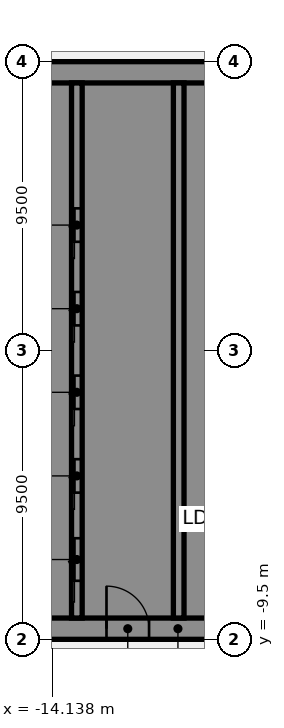
"""IFC4 building model, lengths in metres.
Left out: names, types, materials, properties, quantities, classifications, styles, units other than length and angle.
Written with IfcOpenShell. Run it as: python <this file> out.ifc"""

import sys

from ifc_helpers import new_model, si_unit, direction, frame, frame_2d, origin, place, context, subcontext, project, spatial, polyline, rectangle, outline, extrude, element, fill, save


model = new_model("IFC4")
c1 = context("Model", 3, precision=1e-05, world=origin(), true_north=direction((0.0, 1.0)))
c2 = subcontext(c1, "Body", "Model", "MODEL_VIEW")
j1 = project(units=[si_unit("LENGTHUNIT", "METRE"), si_unit("PLANEANGLEUNIT", "RADIAN")], contexts=[c1])
p1 = place(None, origin())
s1 = spatial("IfcSite", under=j1, at=p1, CompositionType="ELEMENT")
p2 = place(p1, origin())
s2 = spatial("IfcBuilding", under=s1, at=p2, CompositionType="ELEMENT")
p3 = place(p2, frame((0.0, 0.0, 20.0)))
s3 = spatial("IfcBuildingStorey", under=s2, at=p3, CompositionType="ELEMENT", Elevation=20.0)
p4 = place(p3, frame((-16.5, -9.15, 0.0), z_axis=(0.0, 0.0, 1.0), x_axis=(1.0, 0.0, 0.0)))
e1 = element("IfcWall", 1, at=p4, inside=s3, PredefinedType="SHEAR", context=c2, shape_type="SweptSolid", body=[
    extrude(rectangle(XDim=13.0, YDim=0.7, at=frame_2d((6.5, 0.0))), origin(), (0.0, 0.0, 1.0), 4.55),
])
p5 = place(p4, frame((4.15, 0.0, 0.0)))
e2 = element("IfcOpeningElement", 2, at=p5, cuts=e1, PredefinedType="OPENING", context=c2, shape_type="SweptSolid", body=[
    extrude(rectangle(XDim=1.4, YDim=2.1, at=frame_2d((0.7, 1.05))), frame((0.0, 0.36, 0.0), z_axis=(0.0, -1.0, 0.0), x_axis=(1.0, 0.0, 0.0)), (0.0, 0.0, 1.0), 0.72),
])
p6 = place(p4, frame((10.125, 0.0, 0.0)))
e3 = element("IfcOpeningElement", 3, at=p6, cuts=e1, PredefinedType="OPENING", context=c2, shape_type="SweptSolid", body=[
    extrude(rectangle(XDim=1.4, YDim=2.1, at=frame_2d((0.7, 1.05))), frame((0.0, 0.36, 0.0), z_axis=(0.0, -1.0, 0.0), x_axis=(1.0, 0.0, 0.0)), (0.0, 0.0, 1.0), 0.72),
])
p7 = place(p3, origin())
e4 = element("IfcWall", 4, at=p7, inside=s3, PredefinedType="SHEAR", context=c2, shape_type="SweptSolid", body=[
    extrude(outline(polyline([(-13.5, -8.8), (-13.5, -8.125), (-15.8, -8.125), (-15.8, -5.625), (-13.5, -5.625), (-13.5, -5.375), (-15.8, -5.375), (-15.8, -2.875), (-13.5, -2.875), (-13.5, -2.625), (-15.8, -2.625), (-15.8, -0.125), (-13.5, -0.125), (-13.5, 0.125), (-15.8, 0.125), (-15.8, 2.625), (-13.5, 2.625), (-13.5, 2.875), (-15.8, 2.875), (-15.8, 5.375), (-13.5, 5.375), (-13.5, 5.625), (-15.8, 5.625), (-15.8, 8.125), (-13.5, 8.125), (-13.5, 8.8), (-15.8, 8.8), (-16.5, 8.8), (-16.5, -8.8), (-15.8, -8.8), (-13.5, -8.8)])), origin(), (0.0, 0.0, 1.0), 4.55),
])
p8 = place(p3, frame((-16.5, 9.15, 0.0), z_axis=(0.0, 0.0, 1.0), x_axis=(1.0, 0.0, 0.0)))
e5 = element("IfcWall", 5, at=p8, inside=s3, PredefinedType="SHEAR", context=c2, shape_type="SweptSolid", body=[
    extrude(rectangle(XDim=13.0, YDim=0.7, at=frame_2d((6.5, 0.0))), origin(), (0.0, 0.0, 1.0), 4.55),
])
p9 = place(p3, origin())
e6 = element("IfcWall", 6, at=p9, inside=s3, PredefinedType="SHEAR", context=c2, shape_type="SweptSolid", body=[
    extrude(outline(polyline([(-9.8, -5.375), (-9.8, -5.625), (-7.5, -5.625), (-7.15, -5.625), (-7.15, 8.8), (-7.5, 8.8), (-9.8, 8.8), (-9.8, 8.125), (-7.5, 8.125), (-7.5, 5.625), (-9.8, 5.625), (-9.8, 5.375), (-7.5, 5.375), (-7.5, 2.875), (-9.8, 2.875), (-9.8, 2.625), (-7.5, 2.625), (-7.5, 0.125), (-9.8, 0.125), (-9.8, -0.125), (-7.5, -0.125), (-7.5, -2.625), (-9.8, -2.625), (-9.8, -2.875), (-7.5, -2.875), (-7.5, -5.375), (-9.8, -5.375)])), origin(), (0.0, 0.0, 1.0), 4.55),
])
p10 = place(p3, origin())
e7 = element("IfcWall", 7, at=p10, inside=s3, PredefinedType="SHEAR", context=c2, shape_type="SweptSolid", body=[
    extrude(outline(polyline([(-7.5, -8.125), (-9.55, -8.125), (-9.55, -5.625), (-9.8, -5.625), (-9.8, -8.125), (-9.8, -8.8), (-7.5, -8.8), (-7.5, -8.125)])), origin(), (0.0, 0.0, 1.0), 4.55),
])
p11 = place(p3, frame((-13.325, -8.8, 0.0), z_axis=(0.0, 0.0, 1.0), x_axis=(0.0, 1.0, 0.0)))
e8 = element("IfcWall", 8, at=p11, inside=s3, PredefinedType="SHEAR", context=c2, shape_type="SweptSolid", body=[
    extrude(rectangle(XDim=17.6, YDim=0.35, at=frame_2d((8.8, 0.0))), origin(), (0.0, 0.0, 1.0), 4.55),
])
p12 = place(p11, frame((1.225, 0.0, 0.0)))
e9 = element("IfcOpeningElement", 9, at=p12, cuts=e8, PredefinedType="OPENING", context=c2, shape_type="SweptSolid", body=[
    extrude(rectangle(XDim=1.4, YDim=2.1, at=frame_2d((0.7, 1.05))), frame((0.0, 0.185, 0.0), z_axis=(0.0, -1.0, 0.0), x_axis=(1.0, 0.0, 0.0)), (0.0, 0.0, 1.0), 0.37),
])
p13 = place(p11, frame((4.125, 0.0, 0.0)))
e10 = element("IfcOpeningElement", 10, at=p13, cuts=e8, PredefinedType="OPENING", context=c2, shape_type="SweptSolid", body=[
    extrude(rectangle(XDim=1.1, YDim=2.1, at=frame_2d((0.55, 1.05))), frame((0.0, 0.185, 0.0), z_axis=(0.0, -1.0, 0.0), x_axis=(1.0, 0.0, 0.0)), (0.0, 0.0, 1.0), 0.37),
])
p14 = place(p11, frame((6.875, 0.0, 0.0)))
e11 = element("IfcOpeningElement", 11, at=p14, cuts=e8, PredefinedType="OPENING", context=c2, shape_type="SweptSolid", body=[
    extrude(rectangle(XDim=1.1, YDim=2.1, at=frame_2d((0.55, 1.05))), frame((0.0, 0.185, 0.0), z_axis=(0.0, -1.0, 0.0), x_axis=(1.0, 0.0, 0.0)), (0.0, 0.0, 1.0), 0.37),
])
p15 = place(p11, frame((9.625, 0.0, 0.0)))
e12 = element("IfcOpeningElement", 12, at=p15, cuts=e8, PredefinedType="OPENING", context=c2, shape_type="SweptSolid", body=[
    extrude(rectangle(XDim=1.1, YDim=2.1, at=frame_2d((0.55, 1.05))), frame((0.0, 0.185, 0.0), z_axis=(0.0, -1.0, 0.0), x_axis=(1.0, 0.0, 0.0)), (0.0, 0.0, 1.0), 0.37),
])
p16 = place(p11, frame((12.375, 0.0, 0.0)))
e13 = element("IfcOpeningElement", 13, at=p16, cuts=e8, PredefinedType="OPENING", context=c2, shape_type="SweptSolid", body=[
    extrude(rectangle(XDim=1.1, YDim=2.1, at=frame_2d((0.55, 1.05))), frame((0.0, 0.185, 0.0), z_axis=(0.0, -1.0, 0.0), x_axis=(1.0, 0.0, 0.0)), (0.0, 0.0, 1.0), 0.37),
])
p17 = place(p3, frame((-9.975, -8.8, 0.0), z_axis=(0.0, 0.0, 1.0), x_axis=(0.0, 1.0, 0.0)))
e14 = element("IfcWall", 14, at=p17, inside=s3, PredefinedType="SHEAR", context=c2, shape_type="SweptSolid", body=[
    extrude(rectangle(XDim=17.6, YDim=0.35, at=frame_2d((8.8, 0.0))), origin(), (0.0, 0.0, 1.0), 4.55),
])
p18 = place(p5, origin())
e15 = element("IfcDoor", 15, at=p18, inside=s3, OperationType="SINGLE_SWING_LEFT", PredefinedType="DOOR", context=c2, shape_type="SweptSolid", body=[
    extrude(rectangle(XDim=1.4, YDim=2.1, at=frame_2d((0.7, 1.05))), frame((0.0, 0.025, 0.0), z_axis=(0.0, -1.0, 0.0), x_axis=(1.0, 0.0, 0.0)), (0.0, 0.0, 1.0), 0.05),
])
fill(e2, e15)
p19 = place(p12, origin())
e16 = element("IfcDoor", 16, at=p19, inside=s3, OperationType="SLIDING_TO_LEFT", PredefinedType="DOOR", context=c2, shape_type="SweptSolid", body=[
    extrude(rectangle(XDim=1.4, YDim=2.1, at=frame_2d((0.7, 1.05))), frame((0.0, 0.025, 0.0), z_axis=(0.0, -1.0, 0.0), x_axis=(1.0, 0.0, 0.0)), (0.0, 0.0, 1.0), 0.05),
])
fill(e9, e16)
p20 = place(p13, origin())
e17 = element("IfcDoor", 17, at=p20, inside=s3, OperationType="SLIDING_TO_LEFT", PredefinedType="DOOR", context=c2, shape_type="SweptSolid", body=[
    extrude(rectangle(XDim=1.1, YDim=2.1, at=frame_2d((0.55, 1.05))), frame((0.0, 0.025, 0.0), z_axis=(0.0, -1.0, 0.0), x_axis=(1.0, 0.0, 0.0)), (0.0, 0.0, 1.0), 0.05),
])
fill(e10, e17)
p21 = place(p14, origin())
e18 = element("IfcDoor", 18, at=p21, inside=s3, OperationType="SLIDING_TO_LEFT", PredefinedType="DOOR", context=c2, shape_type="SweptSolid", body=[
    extrude(rectangle(XDim=1.1, YDim=2.1, at=frame_2d((0.55, 1.05))), frame((0.0, 0.025, 0.0), z_axis=(0.0, -1.0, 0.0), x_axis=(1.0, 0.0, 0.0)), (0.0, 0.0, 1.0), 0.05),
])
fill(e11, e18)
p22 = place(p15, origin())
e19 = element("IfcDoor", 19, at=p22, inside=s3, OperationType="SLIDING_TO_LEFT", PredefinedType="DOOR", context=c2, shape_type="SweptSolid", body=[
    extrude(rectangle(XDim=1.1, YDim=2.1, at=frame_2d((0.55, 1.05))), frame((0.0, 0.025, 0.0), z_axis=(0.0, -1.0, 0.0), x_axis=(1.0, 0.0, 0.0)), (0.0, 0.0, 1.0), 0.05),
])
fill(e12, e19)
p23 = place(p16, origin())
e20 = element("IfcDoor", 20, at=p23, inside=s3, OperationType="SLIDING_TO_LEFT", PredefinedType="DOOR", context=c2, shape_type="SweptSolid", body=[
    extrude(rectangle(XDim=1.1, YDim=2.1, at=frame_2d((0.55, 1.05))), frame((0.0, 0.025, 0.0), z_axis=(0.0, -1.0, 0.0), x_axis=(1.0, 0.0, 0.0)), (0.0, 0.0, 1.0), 0.05),
])
fill(e13, e20)
save(model, sys.argv[1])
